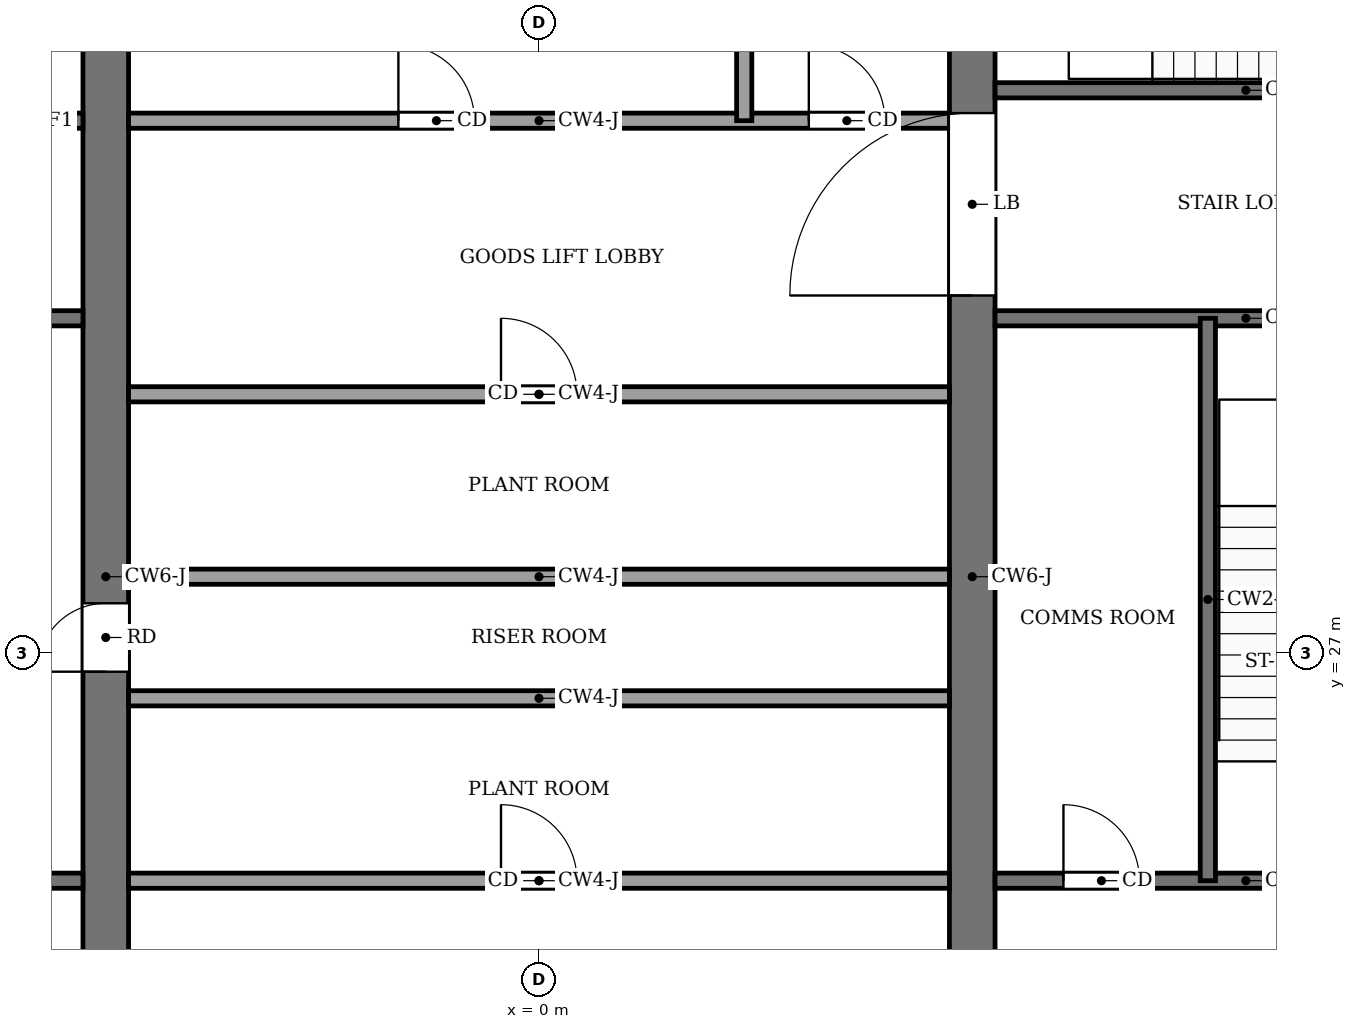
"""IFC4 building model, lengths in metres.
Left out: names, types, materials, properties, quantities, classifications, styles, units other than length and angle.
Written with IfcOpenShell. Run it as: python <this file> out.ifc"""

import sys

from ifc_helpers import new_model, si_unit, direction, frame, frame_2d, origin, place, context, subcontext, project, spatial, rectangle, extrude, element, fill, save


model = new_model("IFC4")
c1 = context("Model", 3, precision=1e-05, world=origin(), true_north=direction((0.0, 1.0)))
c2 = subcontext(c1, "Body", "Model", "MODEL_VIEW")
j1 = project(units=[si_unit("LENGTHUNIT", "METRE"), si_unit("PLANEANGLEUNIT", "RADIAN")], contexts=[c1])
p1 = place(None, origin())
s1 = spatial("IfcSite", under=j1, at=p1, CompositionType="ELEMENT")
p2 = place(p1, origin())
s2 = spatial("IfcBuilding", under=s1, at=p2, CompositionType="ELEMENT")
p3 = place(p2, frame((0.0, 0.0, 359.5)))
s3 = spatial("IfcBuildingStorey", under=s2, at=p3, CompositionType="ELEMENT", Elevation=359.5)
p4 = place(p3, frame((-5.7, 18.4, -0.15), z_axis=(0.0, 0.0, 1.0), x_axis=(0.0, 1.0, 0.0)))
e1 = element("IfcWall", 1, at=p4, inside=s3, PredefinedType="SHEAR", context=c2, shape_type="SweptSolid", body=[
    extrude(rectangle(XDim=19.2, YDim=0.6, at=frame_2d((9.6, 0.0))), origin(), (0.0, 0.0, 1.0), 4.5),
])
p5 = place(p4, frame((8.35, 0.0, 0.15)))
e2 = element("IfcOpeningElement", 2, at=p5, cuts=e1, PredefinedType="OPENING", context=c2, shape_type="SweptSolid", body=[
    extrude(rectangle(XDim=0.9, YDim=2.1, at=frame_2d((0.45, 1.05))), frame((0.0, 0.31, 0.0), z_axis=(0.0, -1.0, 0.0), x_axis=(1.0, 0.0, 0.0)), (0.0, 0.0, 1.0), 0.62),
])
p6 = place(p3, frame((5.7, 18.4, -0.15), z_axis=(0.0, 0.0, 1.0), x_axis=(0.0, 1.0, 0.0)))
e3 = element("IfcWall", 3, at=p6, inside=s3, PredefinedType="SHEAR", context=c2, shape_type="SweptSolid", body=[
    extrude(rectangle(XDim=19.2, YDim=0.6, at=frame_2d((9.6, 0.0))), origin(), (0.0, 0.0, 1.0), 4.5),
])
p7 = place(p6, frame((13.3, 0.0, 0.15)))
e4 = element("IfcOpeningElement", 4, at=p7, cuts=e3, PredefinedType="OPENING", context=c2, shape_type="SweptSolid", body=[
    extrude(rectangle(XDim=2.4, YDim=2.4, at=frame_2d((1.2, 1.2))), frame((0.0, 0.31, 0.0), z_axis=(0.0, -1.0, 0.0), x_axis=(1.0, 0.0, 0.0)), (0.0, 0.0, 1.0), 0.62),
])
p8 = place(p3, frame((-12.6, 24.0, 0.0), z_axis=(0.0, 0.0, 1.0), x_axis=(1.0, 0.0, 0.0)))
e5 = element("IfcWall", 5, at=p8, inside=s3, PredefinedType="PARTITIONING", context=c2, shape_type="SweptSolid", body=[
    extrude(rectangle(XDim=6.6, YDim=0.2, at=frame_2d((3.3, 0.0))), origin(), (0.0, 0.0, 1.0), 4.35),
])
p9 = place(p8, frame((4.7, 0.0, 0.0)))
e6 = element("IfcOpeningElement", 6, at=p9, cuts=e5, PredefinedType="OPENING", context=c2, shape_type="SweptSolid", body=[
    extrude(rectangle(XDim=1.0, YDim=2.1, at=frame_2d((0.5, 1.05))), frame((0.0, 0.11, 0.0), z_axis=(0.0, -1.0, 0.0), x_axis=(1.0, 0.0, 0.0)), (0.0, 0.0, 1.0), 0.22),
])
p10 = place(p3, frame((-5.4, 24.0, 0.0), z_axis=(0.0, 0.0, 1.0), x_axis=(1.0, 0.0, 0.0)))
e7 = element("IfcWall", 7, at=p10, inside=s3, PredefinedType="PARTITIONING", context=c2, shape_type="SweptSolid", body=[
    extrude(rectangle(XDim=10.8, YDim=0.2, at=frame_2d((5.4, 0.0))), origin(), (0.0, 0.0, 1.0), 4.35),
])
p11 = place(p10, frame((4.9, 0.0, 0.0)))
e8 = element("IfcOpeningElement", 8, at=p11, cuts=e7, PredefinedType="OPENING", context=c2, shape_type="SweptSolid", body=[
    extrude(rectangle(XDim=1.0, YDim=2.1, at=frame_2d((0.5, 1.05))), frame((0.0, 0.11, 0.0), z_axis=(0.0, -1.0, 0.0), x_axis=(1.0, 0.0, 0.0)), (0.0, 0.0, 1.0), 0.22),
])
p12 = place(p3, frame((6.0, 24.0, 0.0), z_axis=(0.0, 0.0, 1.0), x_axis=(1.0, 0.0, 0.0)))
e9 = element("IfcWall", 9, at=p12, inside=s3, PredefinedType="PARTITIONING", context=c2, shape_type="SweptSolid", body=[
    extrude(rectangle(XDim=6.6, YDim=0.2, at=frame_2d((3.3, 0.0))), origin(), (0.0, 0.0, 1.0), 4.35),
])
p13 = place(p12, frame((0.9, 0.0, 0.0)))
e10 = element("IfcOpeningElement", 10, at=p13, cuts=e9, PredefinedType="OPENING", context=c2, shape_type="SweptSolid", body=[
    extrude(rectangle(XDim=1.0, YDim=2.1, at=frame_2d((0.5, 1.05))), frame((0.0, 0.11, 0.0), z_axis=(0.0, -1.0, 0.0), x_axis=(1.0, 0.0, 0.0)), (0.0, 0.0, 1.0), 0.22),
])
p14 = place(p12, frame((4.4, 0.0, 0.0)))
e11 = element("IfcOpeningElement", 11, at=p14, cuts=e9, PredefinedType="OPENING", context=c2, shape_type="SweptSolid", body=[
    extrude(rectangle(XDim=1.2, YDim=2.2, at=frame_2d((0.6, 1.1))), frame((0.0, 0.11, 0.0), z_axis=(0.0, -1.0, 0.0), x_axis=(1.0, 0.0, 0.0)), (0.0, 0.0, 1.0), 0.22),
])
for number, where, z_axis, x_axis in (
    (12, (-5.4, 26.4, 0.0), (0.0, 0.0, 1.0), (1.0, 0.0, 0.0)),
    (13, (-5.4, 28.0, 0.0), (0.0, 0.0, 1.0), (1.0, 0.0, 0.0)),
):
    element("IfcWall", number, at=place(p3, frame(where, z_axis=z_axis, x_axis=x_axis)), inside=s3, PredefinedType="PARTITIONING", context=c2, shape_type="SweptSolid", body=[
        extrude(rectangle(XDim=10.8, YDim=0.2, at=frame_2d((5.4, 0.0))), origin(), (0.0, 0.0, 1.0), 4.35),
    ])
p15 = place(p3, frame((-5.4, 30.4, 0.0), z_axis=(0.0, 0.0, 1.0), x_axis=(1.0, 0.0, 0.0)))
e14 = element("IfcWall", 14, at=p15, inside=s3, PredefinedType="PARTITIONING", context=c2, shape_type="SweptSolid", body=[
    extrude(rectangle(XDim=10.8, YDim=0.2, at=frame_2d((5.4, 0.0))), origin(), (0.0, 0.0, 1.0), 4.35),
])
p16 = place(p15, frame((4.9, 0.0, 0.0)))
e15 = element("IfcOpeningElement", 15, at=p16, cuts=e14, PredefinedType="OPENING", context=c2, shape_type="SweptSolid", body=[
    extrude(rectangle(XDim=1.0, YDim=2.1, at=frame_2d((0.5, 1.05))), frame((0.0, 0.11, 0.0), z_axis=(0.0, -1.0, 0.0), x_axis=(1.0, 0.0, 0.0)), (0.0, 0.0, 1.0), 0.22),
])
p17 = place(p3, frame((-12.6, 31.4, 0.0), z_axis=(0.0, 0.0, 1.0), x_axis=(1.0, 0.0, 0.0)))
e16 = element("IfcWall", 16, at=p17, inside=s3, PredefinedType="PARTITIONING", context=c2, shape_type="SweptSolid", body=[
    extrude(rectangle(XDim=6.6, YDim=0.2, at=frame_2d((3.3, 0.0))), origin(), (0.0, 0.0, 1.0), 4.35),
])
p18 = place(p17, frame((1.0, 0.0, 0.0)))
e17 = element("IfcOpeningElement", 17, at=p18, cuts=e16, PredefinedType="OPENING", context=c2, shape_type="SweptSolid", body=[
    extrude(rectangle(XDim=1.2, YDim=2.2, at=frame_2d((0.6, 1.1))), frame((0.0, 0.11, 0.0), z_axis=(0.0, -1.0, 0.0), x_axis=(1.0, 0.0, 0.0)), (0.0, 0.0, 1.0), 0.22),
])
p19 = place(p3, frame((6.0, 31.4, 0.0), z_axis=(0.0, 0.0, 1.0), x_axis=(1.0, 0.0, 0.0)))
e18 = element("IfcWall", 18, at=p19, inside=s3, PredefinedType="PARTITIONING", context=c2, shape_type="SweptSolid", body=[
    extrude(rectangle(XDim=6.6, YDim=0.2, at=frame_2d((3.3, 0.0))), origin(), (0.0, 0.0, 1.0), 4.35),
])
p20 = place(p3, frame((-12.6, 34.0, 0.0), z_axis=(0.0, 0.0, 1.0), x_axis=(1.0, 0.0, 0.0)))
e19 = element("IfcWall", 19, at=p20, inside=s3, PredefinedType="PARTITIONING", context=c2, shape_type="SweptSolid", body=[
    extrude(rectangle(XDim=6.6, YDim=0.2, at=frame_2d((3.3, 0.0))), origin(), (0.0, 0.0, 1.0), 4.35),
])
p21 = place(p20, frame((4.7, 0.0, 0.0)))
e20 = element("IfcOpeningElement", 20, at=p21, cuts=e19, PredefinedType="OPENING", context=c2, shape_type="SweptSolid", body=[
    extrude(rectangle(XDim=1.4, YDim=2.2, at=frame_2d((0.7, 1.1))), frame((0.0, 0.11, 0.0), z_axis=(0.0, -1.0, 0.0), x_axis=(1.0, 0.0, 0.0)), (0.0, 0.0, 1.0), 0.22),
])
p22 = place(p20, frame((2.3, 0.0, 0.0)))
e21 = element("IfcOpeningElement", 21, at=p22, cuts=e19, PredefinedType="OPENING", context=c2, shape_type="SweptSolid", body=[
    extrude(rectangle(XDim=1.4, YDim=2.2, at=frame_2d((0.7, 1.1))), frame((0.0, 0.11, 0.0), z_axis=(0.0, -1.0, 0.0), x_axis=(1.0, 0.0, 0.0)), (0.0, 0.0, 1.0), 0.22),
])
p23 = place(p20, frame((0.45, 0.0, 0.0)))
e22 = element("IfcOpeningElement", 22, at=p23, cuts=e19, PredefinedType="OPENING", context=c2, shape_type="SweptSolid", body=[
    extrude(rectangle(XDim=0.9, YDim=2.1, at=frame_2d((0.45, 1.05))), frame((0.0, 0.11, 0.0), z_axis=(0.0, -1.0, 0.0), x_axis=(1.0, 0.0, 0.0)), (0.0, 0.0, 1.0), 0.22),
])
p24 = place(p3, frame((-5.4, 34.0, 0.0), z_axis=(0.0, 0.0, 1.0), x_axis=(1.0, 0.0, 0.0)))
e23 = element("IfcWall", 23, at=p24, inside=s3, PredefinedType="PARTITIONING", context=c2, shape_type="SweptSolid", body=[
    extrude(rectangle(XDim=10.8, YDim=0.2, at=frame_2d((5.4, 0.0))), origin(), (0.0, 0.0, 1.0), 4.35),
])
p25 = place(p24, frame((3.55, 0.0, 0.0)))
e24 = element("IfcOpeningElement", 24, at=p25, cuts=e23, PredefinedType="OPENING", context=c2, shape_type="SweptSolid", body=[
    extrude(rectangle(XDim=1.0, YDim=2.1, at=frame_2d((0.5, 1.05))), frame((0.0, 0.11, 0.0), z_axis=(0.0, -1.0, 0.0), x_axis=(1.0, 0.0, 0.0)), (0.0, 0.0, 1.0), 0.22),
])
p26 = place(p24, frame((8.95, 0.0, 0.0)))
e25 = element("IfcOpeningElement", 25, at=p26, cuts=e23, PredefinedType="OPENING", context=c2, shape_type="SweptSolid", body=[
    extrude(rectangle(XDim=1.0, YDim=2.1, at=frame_2d((0.5, 1.05))), frame((0.0, 0.11, 0.0), z_axis=(0.0, -1.0, 0.0), x_axis=(1.0, 0.0, 0.0)), (0.0, 0.0, 1.0), 0.22),
])
p27 = place(p3, frame((6.0, 34.4, 0.0), z_axis=(0.0, 0.0, 1.0), x_axis=(1.0, 0.0, 0.0)))
e26 = element("IfcWall", 26, at=p27, inside=s3, PredefinedType="PARTITIONING", context=c2, shape_type="SweptSolid", body=[
    extrude(rectangle(XDim=6.6, YDim=0.2, at=frame_2d((3.3, 0.0))), origin(), (0.0, 0.0, 1.0), 4.35),
])
p28 = place(p27, frame((4.8, 0.0, 0.0)))
e27 = element("IfcOpeningElement", 27, at=p28, cuts=e26, PredefinedType="OPENING", context=c2, shape_type="SweptSolid", body=[
    extrude(rectangle(XDim=1.2, YDim=2.2, at=frame_2d((0.6, 1.1))), frame((0.0, 0.11, 0.0), z_axis=(0.0, -1.0, 0.0), x_axis=(1.0, 0.0, 0.0)), (0.0, 0.0, 1.0), 0.22),
])
p29 = place(p3, frame((2.7, 34.0, 0.0), z_axis=(0.0, 0.0, 1.0), x_axis=(0.0, 1.0, 0.0)))
e28 = element("IfcWall", 28, at=p29, inside=s3, PredefinedType="PARTITIONING", context=c2, shape_type="SweptSolid", body=[
    extrude(rectangle(XDim=3.6, YDim=0.2, at=frame_2d((1.8, 0.0))), origin(), (0.0, 0.0, 1.0), 4.35),
])
p30 = place(p3, frame((8.8, 24.0, 0.0), z_axis=(0.0, 0.0, 1.0), x_axis=(0.0, 1.0, 0.0)))
e29 = element("IfcWall", 29, at=p30, inside=s3, PredefinedType="PARTITIONING", context=c2, shape_type="SweptSolid", body=[
    extrude(rectangle(XDim=7.4, YDim=0.2, at=frame_2d((3.7, 0.0))), origin(), (0.0, 0.0, 1.0), 4.35),
])
p31 = place(p11, origin())
e30 = element("IfcDoor", 30, at=p31, inside=s3, OperationType="SINGLE_SWING_RIGHT", PredefinedType="DOOR", context=c2, shape_type="SweptSolid", body=[
    extrude(rectangle(XDim=1.0, YDim=2.1, at=frame_2d((0.5, 1.05))), frame((0.0, 0.025, 0.0), z_axis=(0.0, -1.0, 0.0), x_axis=(1.0, 0.0, 0.0)), (0.0, 0.0, 1.0), 0.05),
])
fill(e8, e30)
p32 = place(p16, origin())
e31 = element("IfcDoor", 31, at=p32, inside=s3, OperationType="SINGLE_SWING_LEFT", PredefinedType="DOOR", context=c2, shape_type="SweptSolid", body=[
    extrude(rectangle(XDim=1.0, YDim=2.1, at=frame_2d((0.5, 1.05))), frame((0.0, 0.025, 0.0), z_axis=(0.0, -1.0, 0.0), x_axis=(1.0, 0.0, 0.0)), (0.0, 0.0, 1.0), 0.05),
])
fill(e15, e31)
p33 = place(p25, origin())
e32 = element("IfcDoor", 32, at=p33, inside=s3, OperationType="SINGLE_SWING_LEFT", PredefinedType="DOOR", context=c2, shape_type="SweptSolid", body=[
    extrude(rectangle(XDim=1.0, YDim=2.1, at=frame_2d((0.5, 1.05))), frame((0.0, 0.025, 0.0), z_axis=(0.0, -1.0, 0.0), x_axis=(1.0, 0.0, 0.0)), (0.0, 0.0, 1.0), 0.05),
])
fill(e24, e32)
p34 = place(p13, origin())
e33 = element("IfcDoor", 33, at=p34, inside=s3, OperationType="SINGLE_SWING_RIGHT", PredefinedType="DOOR", context=c2, shape_type="SweptSolid", body=[
    extrude(rectangle(XDim=1.0, YDim=2.1, at=frame_2d((0.5, 1.05))), frame((0.0, 0.025, 0.0), z_axis=(0.0, -1.0, 0.0), x_axis=(1.0, 0.0, 0.0)), (0.0, 0.0, 1.0), 0.05),
])
fill(e10, e33)
p35 = place(p26, origin())
e34 = element("IfcDoor", 34, at=p35, inside=s3, OperationType="SINGLE_SWING_LEFT", PredefinedType="DOOR", context=c2, shape_type="SweptSolid", body=[
    extrude(rectangle(XDim=1.0, YDim=2.1, at=frame_2d((0.5, 1.05))), frame((0.0, 0.025, 0.0), z_axis=(0.0, -1.0, 0.0), x_axis=(1.0, 0.0, 0.0)), (0.0, 0.0, 1.0), 0.05),
])
fill(e25, e34)
p36 = place(p5, origin())
e35 = element("IfcDoor", 35, at=p36, inside=s3, OperationType="SINGLE_SWING_LEFT", PredefinedType="DOOR", context=c2, shape_type="SweptSolid", body=[
    extrude(rectangle(XDim=0.9, YDim=2.1, at=frame_2d((0.45, 1.05))), frame((0.0, 0.025, 0.0), z_axis=(0.0, -1.0, 0.0), x_axis=(1.0, 0.0, 0.0)), (0.0, 0.0, 1.0), 0.05),
])
fill(e2, e35)
p37 = place(p7, origin())
e36 = element("IfcDoor", 36, at=p37, inside=s3, OperationType="DOUBLE_DOOR_SINGLE_SWING", PredefinedType="DOOR", context=c2, shape_type="SweptSolid", body=[
    extrude(rectangle(XDim=2.4, YDim=2.4, at=frame_2d((1.2, 1.2))), frame((0.0, 0.025, 0.0), z_axis=(0.0, -1.0, 0.0), x_axis=(1.0, 0.0, 0.0)), (0.0, 0.0, 1.0), 0.05),
])
fill(e4, e36)
save(model, sys.argv[1])
